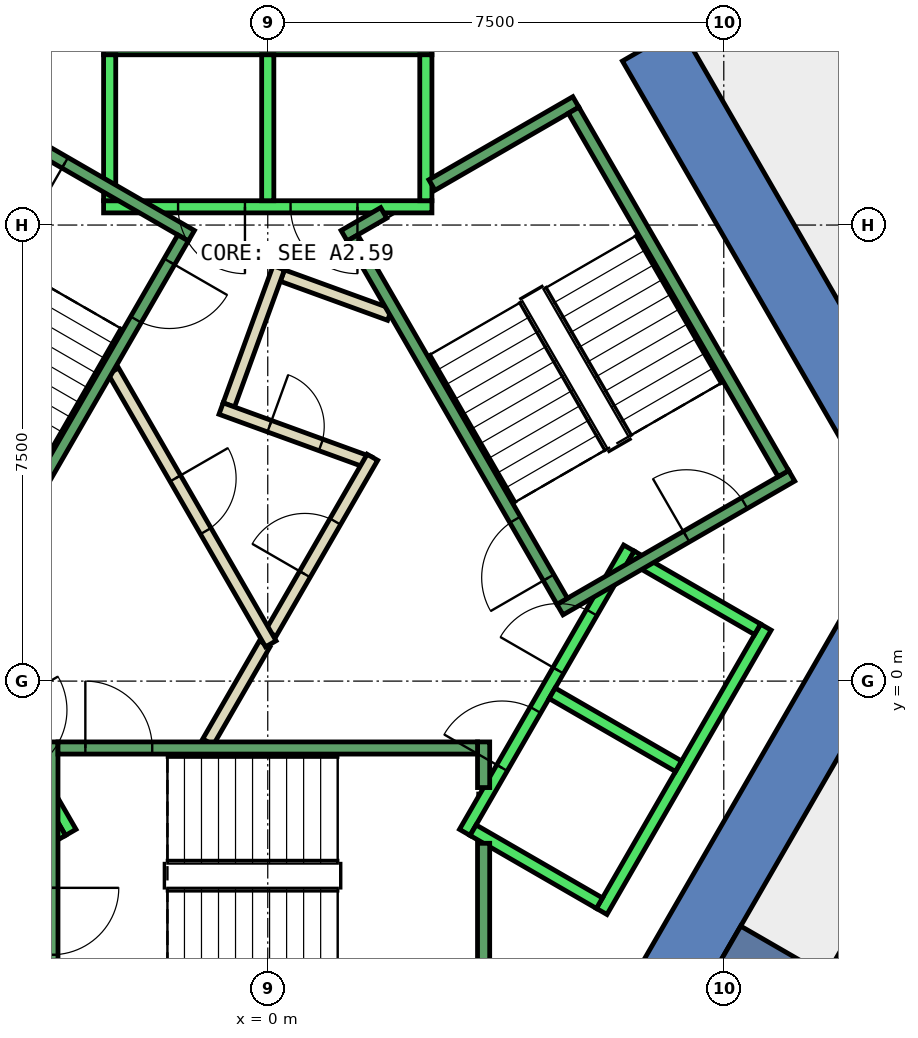
"""IFC4 building model, lengths in metres.
Left out: names, types, materials, properties, quantities, classifications, styles, units other than length and angle.
Written with IfcOpenShell. Run it as: python <this file> out.ifc"""

import sys

from ifc_helpers import new_model, si_unit, direction, frame, frame_2d, origin, place, context, subcontext, project, spatial, polyline, rectangle, outline, extrude, element, fill, save


model = new_model("IFC4")
c1 = context("Model", 3, precision=1e-05, world=origin(), true_north=direction((0.0, 1.0)))
c2 = subcontext(c1, "Body", "Model", "MODEL_VIEW")
j1 = project(units=[si_unit("LENGTHUNIT", "METRE"), si_unit("PLANEANGLEUNIT", "RADIAN")], contexts=[c1])
p1 = place(None, origin())
s1 = spatial("IfcSite", under=j1, at=p1, CompositionType="ELEMENT")
p2 = place(p1, origin())
s2 = spatial("IfcBuilding", under=s1, at=p2, CompositionType="ELEMENT")
p3 = place(p2, frame((0.0, 0.0, 277.4)))
s3 = spatial("IfcBuildingStorey", under=s2, at=p3, CompositionType="ELEMENT", Elevation=277.4)
p4 = place(p3, frame((0.0, 0.0, -0.34)))
e1 = element("IfcWall", 1, at=p4, inside=s3, PredefinedType="SHEAR", context=c2, shape_type="SweptSolid", body=[
    extrude(outline(polyline([(6.786, 10.747), (5.833, 10.197), (10.277, 2.5), (11.547, 2.5), (6.786, 10.747)])), origin(), (0.0, 0.0, 1.0), 3.34),
])
p5 = place(p3, frame((0.0, 0.0, -0.34)))
e2 = element("IfcWall", 2, at=p5, inside=s3, PredefinedType="SHEAR", context=c2, shape_type="SweptSolid", body=[
    extrude(outline(polyline([(5.774, -7.5), (11.547, 2.5), (10.277, 2.5), (5.138, -6.4), (5.774, -7.5)])), origin(), (0.0, 0.0, 1.0), 3.34),
])
p6 = place(p3, frame((7.578, -4.375, -0.34), z_axis=(0.0, 0.0, 1.0), x_axis=(0.866024315419, -0.5000018851, 0.0)))
e3 = element("IfcWall", 3, at=p6, inside=s3, PredefinedType="SHEAR", context=c2, shape_type="SweptSolid", body=[
    extrude(rectangle(XDim=9.0, YDim=0.8, at=frame_2d((4.5, 0.0))), origin(), (0.0, 0.0, 1.0), 3.34),
])
p7 = place(p3, frame((2.005, 6.027, 0.0), z_axis=(0.0, 0.0, 1.0), x_axis=(-0.93978203596, 0.341774377167, 0.0)))
e4 = element("IfcWall", 4, at=p7, inside=s3, PredefinedType="PARTITIONING", context=c2, shape_type="SweptSolid", body=[
    extrude(rectangle(XDim=1.878, YDim=0.2, at=frame_2d((0.939, 0.0))), origin(), (0.0, 0.0, 1.0), 3.0),
])
p8 = place(p3, frame((0.181, 6.797, 0.0), z_axis=(0.0, 0.0, 1.0), x_axis=(-0.342020767299, -0.939692393678, 0.0)))
e5 = element("IfcWall", 5, at=p8, inside=s3, PredefinedType="PARTITIONING", context=c2, shape_type="SweptSolid", body=[
    extrude(rectangle(XDim=2.4, YDim=0.2, at=frame_2d((1.2, 0.0))), origin(), (0.0, 0.0, 1.0), 3.0),
])
p9 = place(p3, frame((-0.768, 4.482, 0.0), z_axis=(0.0, 0.0, 1.0), x_axis=(0.939664280748, -0.342097996905, 0.0)))
e6 = element("IfcWall", 6, at=p9, inside=s3, PredefinedType="PARTITIONING", context=c2, shape_type="SweptSolid", body=[
    extrude(rectangle(XDim=2.595, YDim=0.2, at=frame_2d((1.298, 0.0))), origin(), (0.0, 0.0, 1.0), 3.0),
])
p10 = place(p9, frame((0.848, 0.0, 0.0)))
e7 = element("IfcOpeningElement", 7, at=p10, cuts=e6, PredefinedType="OPENING", context=c2, shape_type="SweptSolid", body=[
    extrude(rectangle(XDim=0.9, YDim=2.1, at=frame_2d((0.45, 1.05))), frame((0.0, 0.11, 0.0), z_axis=(0.0, -1.0, 0.0), x_axis=(1.0, 0.0, 0.0)), (0.0, 0.0, 1.0), 0.22),
])
p11 = place(p3, frame((9.192, 12.643, 0.0), z_axis=(0.0, 0.0, 1.0), x_axis=(0.51491096884, -0.857243660909, 0.0)))
e8 = element("IfcWall", 8, at=p11, inside=s3, PredefinedType="PARTITIONING", context=c2, shape_type="SweptSolid", body=[
    extrude(rectangle(XDim=3.026, YDim=0.2, at=frame_2d((1.513, 0.0))), origin(), (0.0, 0.0, 1.0), 3.0),
])
p12 = place(p11, frame((1.012, 0.0, 0.0)))
e9 = element("IfcOpeningElement", 9, at=p12, cuts=e8, PredefinedType="OPENING", context=c2, shape_type="SweptSolid", body=[
    extrude(rectangle(XDim=1.0, YDim=2.1, at=frame_2d((0.5, 1.05))), frame((0.0, 0.11, 0.0), z_axis=(0.0, -1.0, 0.0), x_axis=(1.0, 0.0, 0.0)), (0.0, 0.0, 1.0), 0.22),
])
p13 = place(p3, frame((-0.982, -1.0, 0.0), z_axis=(0.0, 0.0, 1.0), x_axis=(0.50024047865, 0.865886518847, 0.0)))
e10 = element("IfcWall", 10, at=p13, inside=s3, PredefinedType="PARTITIONING", context=c2, shape_type="SweptSolid", body=[
    extrude(rectangle(XDim=1.863, YDim=0.2, at=frame_2d((0.931, 0.0))), origin(), (0.0, 0.0, 1.0), 3.0),
])
p14 = place(p3, frame((0.05, 0.787, 0.0), z_axis=(0.0, 0.0, 1.0), x_axis=(0.500036563046, 0.866004293071, 0.0)))
e11 = element("IfcWall", 11, at=p14, inside=s3, PredefinedType="PARTITIONING", context=c2, shape_type="SweptSolid", body=[
    extrude(rectangle(XDim=3.342, YDim=0.2, at=frame_2d((1.671, 0.0))), origin(), (0.0, 0.0, 1.0), 3.0),
])
p15 = place(p14, frame((1.121, 0.0, 0.0)))
e12 = element("IfcOpeningElement", 12, at=p15, cuts=e11, PredefinedType="OPENING", context=c2, shape_type="SweptSolid", body=[
    extrude(rectangle(XDim=1.0, YDim=2.1, at=frame_2d((0.5, 1.05))), frame((0.0, 0.11, 0.0), z_axis=(0.0, -1.0, 0.0), x_axis=(1.0, 0.0, 0.0)), (0.0, 0.0, 1.0), 0.22),
])
p16 = place(p3, frame((-2.54, 5.1, 0.0), z_axis=(0.0, 0.0, 1.0), x_axis=(0.499925051871, -0.866068670783, 0.0)))
e13 = element("IfcWall", 13, at=p16, inside=s3, PredefinedType="PARTITIONING", context=c2, shape_type="SweptSolid", body=[
    extrude(rectangle(XDim=5.181, YDim=0.2, at=frame_2d((2.59, 0.0))), origin(), (0.0, 0.0, 1.0), 3.0),
])
p17 = place(p16, frame((2.04, 0.0, 0.0)))
e14 = element("IfcOpeningElement", 14, at=p17, cuts=e13, PredefinedType="OPENING", context=c2, shape_type="SweptSolid", body=[
    extrude(rectangle(XDim=1.0, YDim=2.1, at=frame_2d((0.5, 1.05))), frame((0.0, 0.11, 0.0), z_axis=(0.0, -1.0, 0.0), x_axis=(1.0, 0.0, 0.0)), (0.0, 0.0, 1.0), 0.22),
])
p18 = place(p3, frame((9.25, -4.879, 0.0), z_axis=(0.0, 0.0, 1.0), x_axis=(0.499999725187, 0.866025562448, 0.0)))
e15 = element("IfcWall", 15, at=p18, inside=s3, PredefinedType="PARTITIONING", context=c2, shape_type="SweptSolid", body=[
    extrude(rectangle(XDim=7.876, YDim=0.15, at=frame_2d((3.938, 0.0))), origin(), (0.0, 0.0, 1.0), 3.0),
])
p19 = place(p3, frame((2.7, 7.8, 0.0), z_axis=(0.0, 0.0, 1.0), x_axis=(-1.0, 0.0, 0.0)))
e16 = element("IfcWall", 16, at=p19, inside=s3, PredefinedType="STANDARD", context=c2, shape_type="SweptSolid", body=[
    extrude(rectangle(XDim=5.4, YDim=0.2, at=frame_2d((2.7, 0.0))), origin(), (0.0, 0.0, 1.0), 3.0),
])
p20 = place(p19, frame((1.225, 0.0, 0.0)))
e17 = element("IfcOpeningElement", 17, at=p20, cuts=e16, PredefinedType="OPENING", context=c2, shape_type="SweptSolid", body=[
    extrude(rectangle(XDim=1.1, YDim=2.1, at=frame_2d((0.55, 1.05))), frame((0.0, 0.11, 0.0), z_axis=(0.0, -1.0, 0.0), x_axis=(1.0, 0.0, 0.0)), (0.0, 0.0, 1.0), 0.22),
])
p21 = place(p19, frame((3.075, 0.0, 0.0)))
e18 = element("IfcOpeningElement", 18, at=p21, cuts=e16, PredefinedType="OPENING", context=c2, shape_type="SweptSolid", body=[
    extrude(rectangle(XDim=1.1, YDim=2.1, at=frame_2d((0.55, 1.05))), frame((0.0, 0.11, 0.0), z_axis=(0.0, -1.0, 0.0), x_axis=(1.0, 0.0, 0.0)), (0.0, 0.0, 1.0), 0.22),
])
p22 = place(p3, frame((2.7, 10.4, 0.0), z_axis=(0.0, 0.0, 1.0), x_axis=(-1.0, 0.0, 0.0)))
e19 = element("IfcWall", 19, at=p22, inside=s3, PredefinedType="STANDARD", context=c2, shape_type="SweptSolid", body=[
    extrude(rectangle(XDim=5.4, YDim=0.2, at=frame_2d((2.7, 0.0))), origin(), (0.0, 0.0, 1.0), 3.0),
])
for number, where, z_axis, x_axis in (
    (20, (2.6, 7.9, 0.0), (0.0, 0.0, 1.0), (0.0, 1.0, 0.0)),
    (21, (0.0, 7.9, 0.0), (0.0, 0.0, 1.0), (0.0, 1.0, 0.0)),
    (22, (-2.6, 7.9, 0.0), (0.0, 0.0, 1.0), (0.0, 1.0, 0.0)),
):
    element("IfcWall", number, at=place(p3, frame(where, z_axis=z_axis, x_axis=x_axis)), inside=s3, PredefinedType="STANDARD", context=c2, shape_type="SweptSolid", body=[
        extrude(rectangle(XDim=2.4, YDim=0.2, at=frame_2d((1.2, 0.0))), origin(), (0.0, 0.0, 1.0), 3.0),
    ])
p23 = place(p3, frame((-5.94, 2.188, 0.0), z_axis=(0.0, 0.0, 1.0), x_axis=(0.500034260056, -0.866005622828, 0.0)))
e23 = element("IfcWall", 23, at=p23, inside=s3, PredefinedType="STANDARD", context=c2, shape_type="SweptSolid", body=[
    extrude(rectangle(XDim=5.399, YDim=0.2, at=frame_2d((2.7, 0.0))), origin(), (0.0, 0.0, 1.0), 3.0),
])
p24 = place(p23, frame((3.075, 0.0, 0.0)))
e24 = element("IfcOpeningElement", 24, at=p24, cuts=e23, PredefinedType="OPENING", context=c2, shape_type="SweptSolid", body=[
    extrude(rectangle(XDim=1.1, YDim=2.1, at=frame_2d((0.55, 1.05))), frame((0.0, 0.11, 0.0), z_axis=(0.0, -1.0, 0.0), x_axis=(1.0, 0.0, 0.0)), (0.0, 0.0, 1.0), 0.22),
])
p25 = place(p23, frame((1.225, 0.0, 0.0)))
e25 = element("IfcOpeningElement", 25, at=p25, cuts=e23, PredefinedType="OPENING", context=c2, shape_type="SweptSolid", body=[
    extrude(rectangle(XDim=1.1, YDim=2.1, at=frame_2d((0.55, 1.05))), frame((0.0, 0.11, 0.0), z_axis=(0.0, -1.0, 0.0), x_axis=(1.0, 0.0, 0.0)), (0.0, 0.0, 1.0), 0.22),
])
p26 = place(p3, frame((-3.377, -2.452, 0.0), z_axis=(0.0, 0.0, 1.0), x_axis=(-0.865955154139, -0.50012165622, 0.0)))
e26 = element("IfcWall", 26, at=p26, inside=s3, PredefinedType="STANDARD", context=c2, shape_type="SweptSolid", body=[
    extrude(rectangle(XDim=2.4, YDim=0.2, at=frame_2d((1.2, 0.0))), origin(), (0.0, 0.0, 1.0), 3.0),
])
p27 = place(p3, frame((3.24, -2.488, 0.0), z_axis=(0.0, 0.0, 1.0), x_axis=(0.500034260056, 0.866005622828, 0.0)))
e27 = element("IfcWall", 27, at=p27, inside=s3, PredefinedType="STANDARD", context=c2, shape_type="SweptSolid", body=[
    extrude(rectangle(XDim=5.399, YDim=0.2, at=frame_2d((2.7, 0.0))), origin(), (0.0, 0.0, 1.0), 3.0),
])
p28 = place(p27, frame((3.075, 0.0, 0.0)))
e28 = element("IfcOpeningElement", 28, at=p28, cuts=e27, PredefinedType="OPENING", context=c2, shape_type="SweptSolid", body=[
    extrude(rectangle(XDim=1.1, YDim=2.1, at=frame_2d((0.55, 1.05))), frame((0.0, 0.11, 0.0), z_axis=(0.0, -1.0, 0.0), x_axis=(1.0, 0.0, 0.0)), (0.0, 0.0, 1.0), 0.22),
])
p29 = place(p27, frame((1.225, 0.0, 0.0)))
e29 = element("IfcOpeningElement", 29, at=p29, cuts=e27, PredefinedType="OPENING", context=c2, shape_type="SweptSolid", body=[
    extrude(rectangle(XDim=1.1, YDim=2.1, at=frame_2d((0.55, 1.05))), frame((0.0, 0.11, 0.0), z_axis=(0.0, -1.0, 0.0), x_axis=(1.0, 0.0, 0.0)), (0.0, 0.0, 1.0), 0.22),
])
p30 = place(p3, frame((5.492, -3.788, 0.0), z_axis=(0.0, 0.0, 1.0), x_axis=(0.500034260056, 0.866005622828, 0.0)))
e30 = element("IfcWall", 30, at=p30, inside=s3, PredefinedType="STANDARD", context=c2, shape_type="SweptSolid", body=[
    extrude(rectangle(XDim=5.399, YDim=0.2, at=frame_2d((2.7, 0.0))), origin(), (0.0, 0.0, 1.0), 3.0),
])
p31 = place(p3, frame((3.377, -2.452, 0.0), z_axis=(0.0, 0.0, 1.0), x_axis=(0.865955154139, -0.50012165622, 0.0)))
e31 = element("IfcWall", 31, at=p31, inside=s3, PredefinedType="STANDARD", context=c2, shape_type="SweptSolid", body=[
    extrude(rectangle(XDim=2.4, YDim=0.2, at=frame_2d((1.2, 0.0))), origin(), (0.0, 0.0, 1.0), 3.0),
])
for number, where, z_axis, x_axis in (
    (32, (4.677, -0.2, 0.0), (0.0, 0.0, 1.0), (0.866, -0.5, 0.0)),
    (33, (5.977, 2.052, 0.0), (0.0, 0.0, 1.0), (0.866, -0.5, 0.0)),
):
    element("IfcWall", number, at=place(p3, frame(where, z_axis=z_axis, x_axis=x_axis)), inside=s3, PredefinedType="STANDARD", context=c2, shape_type="SweptSolid", body=[
        extrude(rectangle(XDim=2.399, YDim=0.2, at=frame_2d((1.2, 0.0))), origin(), (0.0, 0.0, 1.0), 3.0),
    ])
p32 = place(p3, frame((-3.55, -1.0, 0.0), z_axis=(0.0, 0.0, 1.0), x_axis=(0.0, -1.0, 0.0)))
e34 = element("IfcWall", 34, at=p32, inside=s3, PredefinedType="STANDARD", context=c2, shape_type="SweptSolid", body=[
    extrude(rectangle(XDim=4.4, YDim=0.2, at=frame_2d((2.2, 0.0))), origin(), (0.0, 0.0, 1.0), 3.0),
])
p33 = place(p32, frame((2.4, 0.0, 0.0)))
e35 = element("IfcOpeningElement", 35, at=p33, cuts=e34, PredefinedType="OPENING", context=c2, shape_type="SweptSolid", body=[
    extrude(rectangle(XDim=1.1, YDim=2.2, at=frame_2d((0.55, 1.1))), frame((0.0, 0.11, 0.0), z_axis=(0.0, -1.0, 0.0), x_axis=(1.0, 0.0, 0.0)), (0.0, 0.0, 1.0), 0.22),
])
p34 = place(p3, frame((3.55, -2.667, 0.0), z_axis=(0.0, 0.0, 1.0), x_axis=(0.0, -1.0, 0.0)))
e36 = element("IfcWall", 36, at=p34, inside=s3, PredefinedType="STANDARD", context=c2, shape_type="SweptSolid", body=[
    extrude(rectangle(XDim=2.733, YDim=0.2, at=frame_2d((1.366, 0.0))), origin(), (0.0, 0.0, 1.0), 3.0),
])
p35 = place(p3, frame((3.55, -1.0, 0.0), z_axis=(0.0, 0.0, 1.0), x_axis=(0.0, -1.0, 0.0)))
e37 = element("IfcWall", 37, at=p35, inside=s3, PredefinedType="STANDARD", context=c2, shape_type="SweptSolid", body=[
    extrude(rectangle(XDim=0.751, YDim=0.2, at=frame_2d((0.375, 0.0))), origin(), (0.0, 0.0, 1.0), 3.0),
])
p36 = place(p3, frame((-3.45, -1.1, 0.0), z_axis=(0.0, 0.0, 1.0), x_axis=(1.0, 0.0, 0.0)))
e38 = element("IfcWall", 38, at=p36, inside=s3, PredefinedType="STANDARD", context=c2, shape_type="SweptSolid", body=[
    extrude(rectangle(XDim=6.9, YDim=0.2, at=frame_2d((3.45, 0.0))), origin(), (0.0, 0.0, 1.0), 3.0),
])
p37 = place(p36, frame((0.45, 0.0, 0.0)))
e39 = element("IfcOpeningElement", 39, at=p37, cuts=e38, PredefinedType="OPENING", context=c2, shape_type="SweptSolid", body=[
    extrude(rectangle(XDim=1.1, YDim=2.2, at=frame_2d((0.55, 1.1))), frame((0.0, 0.11, 0.0), z_axis=(0.0, -1.0, 0.0), x_axis=(1.0, 0.0, 0.0)), (0.0, 0.0, 1.0), 0.22),
])
p38 = place(p3, frame((4.806, 1.176, 0.0), z_axis=(0.0, 0.0, 1.0), x_axis=(0.866059941101, 0.499940174841, 0.0)))
e40 = element("IfcWall", 40, at=p38, inside=s3, PredefinedType="STANDARD", context=c2, shape_type="SweptSolid", body=[
    extrude(rectangle(XDim=4.4, YDim=0.2, at=frame_2d((2.2, 0.0))), origin(), (0.0, 0.0, 1.0), 3.0),
])
p39 = place(p38, frame((2.4, 0.0, 0.0)))
e41 = element("IfcOpeningElement", 41, at=p39, cuts=e40, PredefinedType="OPENING", context=c2, shape_type="SweptSolid", body=[
    extrude(rectangle(XDim=1.1, YDim=2.2, at=frame_2d((0.55, 1.1))), frame((0.0, 0.11, 0.0), z_axis=(0.0, -1.0, 0.0), x_axis=(1.0, 0.0, 0.0)), (0.0, 0.0, 1.0), 0.22),
])
p40 = place(p3, frame((2.7, 8.158, 0.0), z_axis=(0.0, 0.0, 1.0), x_axis=(0.86611865017, 0.499838457731, 0.0)))
e42 = element("IfcWall", 42, at=p40, inside=s3, PredefinedType="STANDARD", context=c2, shape_type="SweptSolid", body=[
    extrude(rectangle(XDim=2.733, YDim=0.2, at=frame_2d((1.366, 0.0))), origin(), (0.0, 0.0, 1.0), 3.0),
])
p41 = place(p3, frame((1.256, 7.324, 0.0), z_axis=(0.0, 0.0, 1.0), x_axis=(0.865915093549, 0.500191014278, 0.0)))
e43 = element("IfcWall", 43, at=p41, inside=s3, PredefinedType="STANDARD", context=c2, shape_type="SweptSolid", body=[
    extrude(rectangle(XDim=0.752, YDim=0.2, at=frame_2d((0.376, 0.0))), origin(), (0.0, 0.0, 1.0), 3.0),
])
p42 = place(p3, frame((4.843, 1.312, 0.0), z_axis=(0.0, 0.0, 1.0), x_axis=(-0.499963383562, 0.866046543262, 0.0)))
e44 = element("IfcWall", 44, at=p42, inside=s3, PredefinedType="STANDARD", context=c2, shape_type="SweptSolid", body=[
    extrude(rectangle(XDim=6.9, YDim=0.2, at=frame_2d((3.45, 0.0))), origin(), (0.0, 0.0, 1.0), 3.0),
])
p43 = place(p42, frame((0.45, 0.0, 0.0)))
e45 = element("IfcOpeningElement", 45, at=p43, cuts=e44, PredefinedType="OPENING", context=c2, shape_type="SweptSolid", body=[
    extrude(rectangle(XDim=1.1, YDim=2.2, at=frame_2d((0.55, 1.1))), frame((0.0, 0.11, 0.0), z_axis=(0.0, -1.0, 0.0), x_axis=(1.0, 0.0, 0.0)), (0.0, 0.0, 1.0), 0.22),
])
p44 = place(p3, frame((8.48, 3.412, 0.0), z_axis=(0.0, 0.0, 1.0), x_axis=(-0.499978703459, 0.866037698999, 0.0)))
e46 = element("IfcWall", 46, at=p44, inside=s3, PredefinedType="STANDARD", context=c2, shape_type="SweptSolid", body=[
    extrude(rectangle(XDim=6.9, YDim=0.2, at=frame_2d((3.45, 0.0))), origin(), (0.0, 0.0, 1.0), 3.0),
])
p45 = place(p3, frame((-1.256, 7.324, 0.0), z_axis=(0.0, 0.0, 1.0), x_axis=(-0.866046073146, 0.499964197906, 0.0)))
e47 = element("IfcWall", 47, at=p45, inside=s3, PredefinedType="STANDARD", context=c2, shape_type="SweptSolid", body=[
    extrude(rectangle(XDim=4.4, YDim=0.2, at=frame_2d((2.2, 0.0))), origin(), (0.0, 0.0, 1.0), 3.0),
])
p46 = place(p45, frame((2.4, 0.0, 0.0)))
e48 = element("IfcOpeningElement", 48, at=p46, cuts=e47, PredefinedType="OPENING", context=c2, shape_type="SweptSolid", body=[
    extrude(rectangle(XDim=1.1, YDim=2.2, at=frame_2d((0.55, 1.1))), frame((0.0, 0.11, 0.0), z_axis=(0.0, -1.0, 0.0), x_axis=(1.0, 0.0, 0.0)), (0.0, 0.0, 1.0), 0.22),
])
p47 = place(p3, frame((-1.393, 7.288, 0.0), z_axis=(0.0, 0.0, 1.0), x_axis=(-0.499963383562, -0.866046543262, 0.0)))
e49 = element("IfcWall", 49, at=p47, inside=s3, PredefinedType="STANDARD", context=c2, shape_type="SweptSolid", body=[
    extrude(rectangle(XDim=6.9, YDim=0.2, at=frame_2d((3.45, 0.0))), origin(), (0.0, 0.0, 1.0), 3.0),
])
p48 = place(p47, frame((0.45, 0.0, 0.0)))
e50 = element("IfcOpeningElement", 50, at=p48, cuts=e49, PredefinedType="OPENING", context=c2, shape_type="SweptSolid", body=[
    extrude(rectangle(XDim=1.1, YDim=2.2, at=frame_2d((0.55, 1.1))), frame((0.0, 0.11, 0.0), z_axis=(0.0, -1.0, 0.0), x_axis=(1.0, 0.0, 0.0)), (0.0, 0.0, 1.0), 0.22),
])
p49 = place(p15, origin())
e51 = element("IfcDoor", 51, at=p49, inside=s3, OperationType="SINGLE_SWING_LEFT", PredefinedType="DOOR", context=c2, shape_type="SweptSolid", body=[
    extrude(rectangle(XDim=1.0, YDim=2.1, at=frame_2d((0.5, 1.05))), frame((0.0, 0.025, 0.0), z_axis=(0.0, -1.0, 0.0), x_axis=(1.0, 0.0, 0.0)), (0.0, 0.0, 1.0), 0.05),
])
fill(e12, e51)
p50 = place(p17, origin())
e52 = element("IfcDoor", 52, at=p50, inside=s3, OperationType="SINGLE_SWING_LEFT", PredefinedType="DOOR", context=c2, shape_type="SweptSolid", body=[
    extrude(rectangle(XDim=1.0, YDim=2.1, at=frame_2d((0.5, 1.05))), frame((0.0, 0.025, 0.0), z_axis=(0.0, -1.0, 0.0), x_axis=(1.0, 0.0, 0.0)), (0.0, 0.0, 1.0), 0.05),
])
fill(e14, e52)
p51 = place(p10, origin())
e53 = element("IfcDoor", 53, at=p51, inside=s3, OperationType="SINGLE_SWING_LEFT", PredefinedType="DOOR", context=c2, shape_type="SweptSolid", body=[
    extrude(rectangle(XDim=0.9, YDim=2.1, at=frame_2d((0.45, 1.05))), frame((0.0, 0.025, 0.0), z_axis=(0.0, -1.0, 0.0), x_axis=(1.0, 0.0, 0.0)), (0.0, 0.0, 1.0), 0.05),
])
fill(e7, e53)
p52 = place(p20, origin())
e54 = element("IfcDoor", 54, at=p52, inside=s3, OperationType="SLIDING_TO_LEFT", PredefinedType="DOOR", context=c2, shape_type="SweptSolid", body=[
    extrude(rectangle(XDim=1.1, YDim=2.1, at=frame_2d((0.55, 1.05))), frame((0.0, 0.025, 0.0), z_axis=(0.0, -1.0, 0.0), x_axis=(1.0, 0.0, 0.0)), (0.0, 0.0, 1.0), 0.05),
])
fill(e17, e54)
p53 = place(p21, origin())
e55 = element("IfcDoor", 55, at=p53, inside=s3, OperationType="SLIDING_TO_LEFT", PredefinedType="DOOR", context=c2, shape_type="SweptSolid", body=[
    extrude(rectangle(XDim=1.1, YDim=2.1, at=frame_2d((0.55, 1.05))), frame((0.0, 0.025, 0.0), z_axis=(0.0, -1.0, 0.0), x_axis=(1.0, 0.0, 0.0)), (0.0, 0.0, 1.0), 0.05),
])
fill(e18, e55)
p54 = place(p28, origin())
e56 = element("IfcDoor", 56, at=p54, inside=s3, OperationType="SLIDING_TO_LEFT", PredefinedType="DOOR", context=c2, shape_type="SweptSolid", body=[
    extrude(rectangle(XDim=1.1, YDim=2.1, at=frame_2d((0.55, 1.05))), frame((0.0, 0.025, 0.0), z_axis=(0.0, -1.0, 0.0), x_axis=(1.0, 0.0, 0.0)), (0.0, 0.0, 1.0), 0.05),
])
fill(e28, e56)
p55 = place(p29, origin())
e57 = element("IfcDoor", 57, at=p55, inside=s3, OperationType="SLIDING_TO_LEFT", PredefinedType="DOOR", context=c2, shape_type="SweptSolid", body=[
    extrude(rectangle(XDim=1.1, YDim=2.1, at=frame_2d((0.55, 1.05))), frame((0.0, 0.025, 0.0), z_axis=(0.0, -1.0, 0.0), x_axis=(1.0, 0.0, 0.0)), (0.0, 0.0, 1.0), 0.05),
])
fill(e29, e57)
p56 = place(p37, origin())
e58 = element("IfcDoor", 58, at=p56, inside=s3, OperationType="SINGLE_SWING_LEFT", PredefinedType="DOOR", context=c2, shape_type="SweptSolid", body=[
    extrude(rectangle(XDim=1.1, YDim=2.2, at=frame_2d((0.55, 1.1))), frame((0.0, 0.025, 0.0), z_axis=(0.0, -1.0, 0.0), x_axis=(1.0, 0.0, 0.0)), (0.0, 0.0, 1.0), 0.05),
])
fill(e39, e58)
p57 = place(p33, origin())
e59 = element("IfcDoor", 59, at=p57, inside=s3, OperationType="SINGLE_SWING_LEFT", PredefinedType="DOOR", context=c2, shape_type="SweptSolid", body=[
    extrude(rectangle(XDim=1.1, YDim=2.2, at=frame_2d((0.55, 1.1))), frame((0.0, 0.025, 0.0), z_axis=(0.0, -1.0, 0.0), x_axis=(1.0, 0.0, 0.0)), (0.0, 0.0, 1.0), 0.05),
])
fill(e35, e59)
p58 = place(p43, origin())
e60 = element("IfcDoor", 60, at=p58, inside=s3, OperationType="SINGLE_SWING_LEFT", PredefinedType="DOOR", context=c2, shape_type="SweptSolid", body=[
    extrude(rectangle(XDim=1.1, YDim=2.2, at=frame_2d((0.55, 1.1))), frame((0.0, 0.025, 0.0), z_axis=(0.0, -1.0, 0.0), x_axis=(1.0, 0.0, 0.0)), (0.0, 0.0, 1.0), 0.05),
])
fill(e45, e60)
p59 = place(p39, origin())
e61 = element("IfcDoor", 61, at=p59, inside=s3, OperationType="SINGLE_SWING_LEFT", PredefinedType="DOOR", context=c2, shape_type="SweptSolid", body=[
    extrude(rectangle(XDim=1.1, YDim=2.2, at=frame_2d((0.55, 1.1))), frame((0.0, 0.025, 0.0), z_axis=(0.0, -1.0, 0.0), x_axis=(1.0, 0.0, 0.0)), (0.0, 0.0, 1.0), 0.05),
])
fill(e41, e61)
p60 = place(p48, origin())
e62 = element("IfcDoor", 62, at=p60, inside=s3, OperationType="SINGLE_SWING_LEFT", PredefinedType="DOOR", context=c2, shape_type="SweptSolid", body=[
    extrude(rectangle(XDim=1.1, YDim=2.2, at=frame_2d((0.55, 1.1))), frame((0.0, 0.025, 0.0), z_axis=(0.0, -1.0, 0.0), x_axis=(1.0, 0.0, 0.0)), (0.0, 0.0, 1.0), 0.05),
])
fill(e50, e62)
p61 = place(p46, origin())
e63 = element("IfcDoor", 63, at=p61, inside=s3, OperationType="SINGLE_SWING_LEFT", PredefinedType="DOOR", context=c2, shape_type="SweptSolid", body=[
    extrude(rectangle(XDim=1.1, YDim=2.2, at=frame_2d((0.55, 1.1))), frame((0.0, 0.025, 0.0), z_axis=(0.0, -1.0, 0.0), x_axis=(1.0, 0.0, 0.0)), (0.0, 0.0, 1.0), 0.05),
])
fill(e48, e63)
save(model, sys.argv[1])
